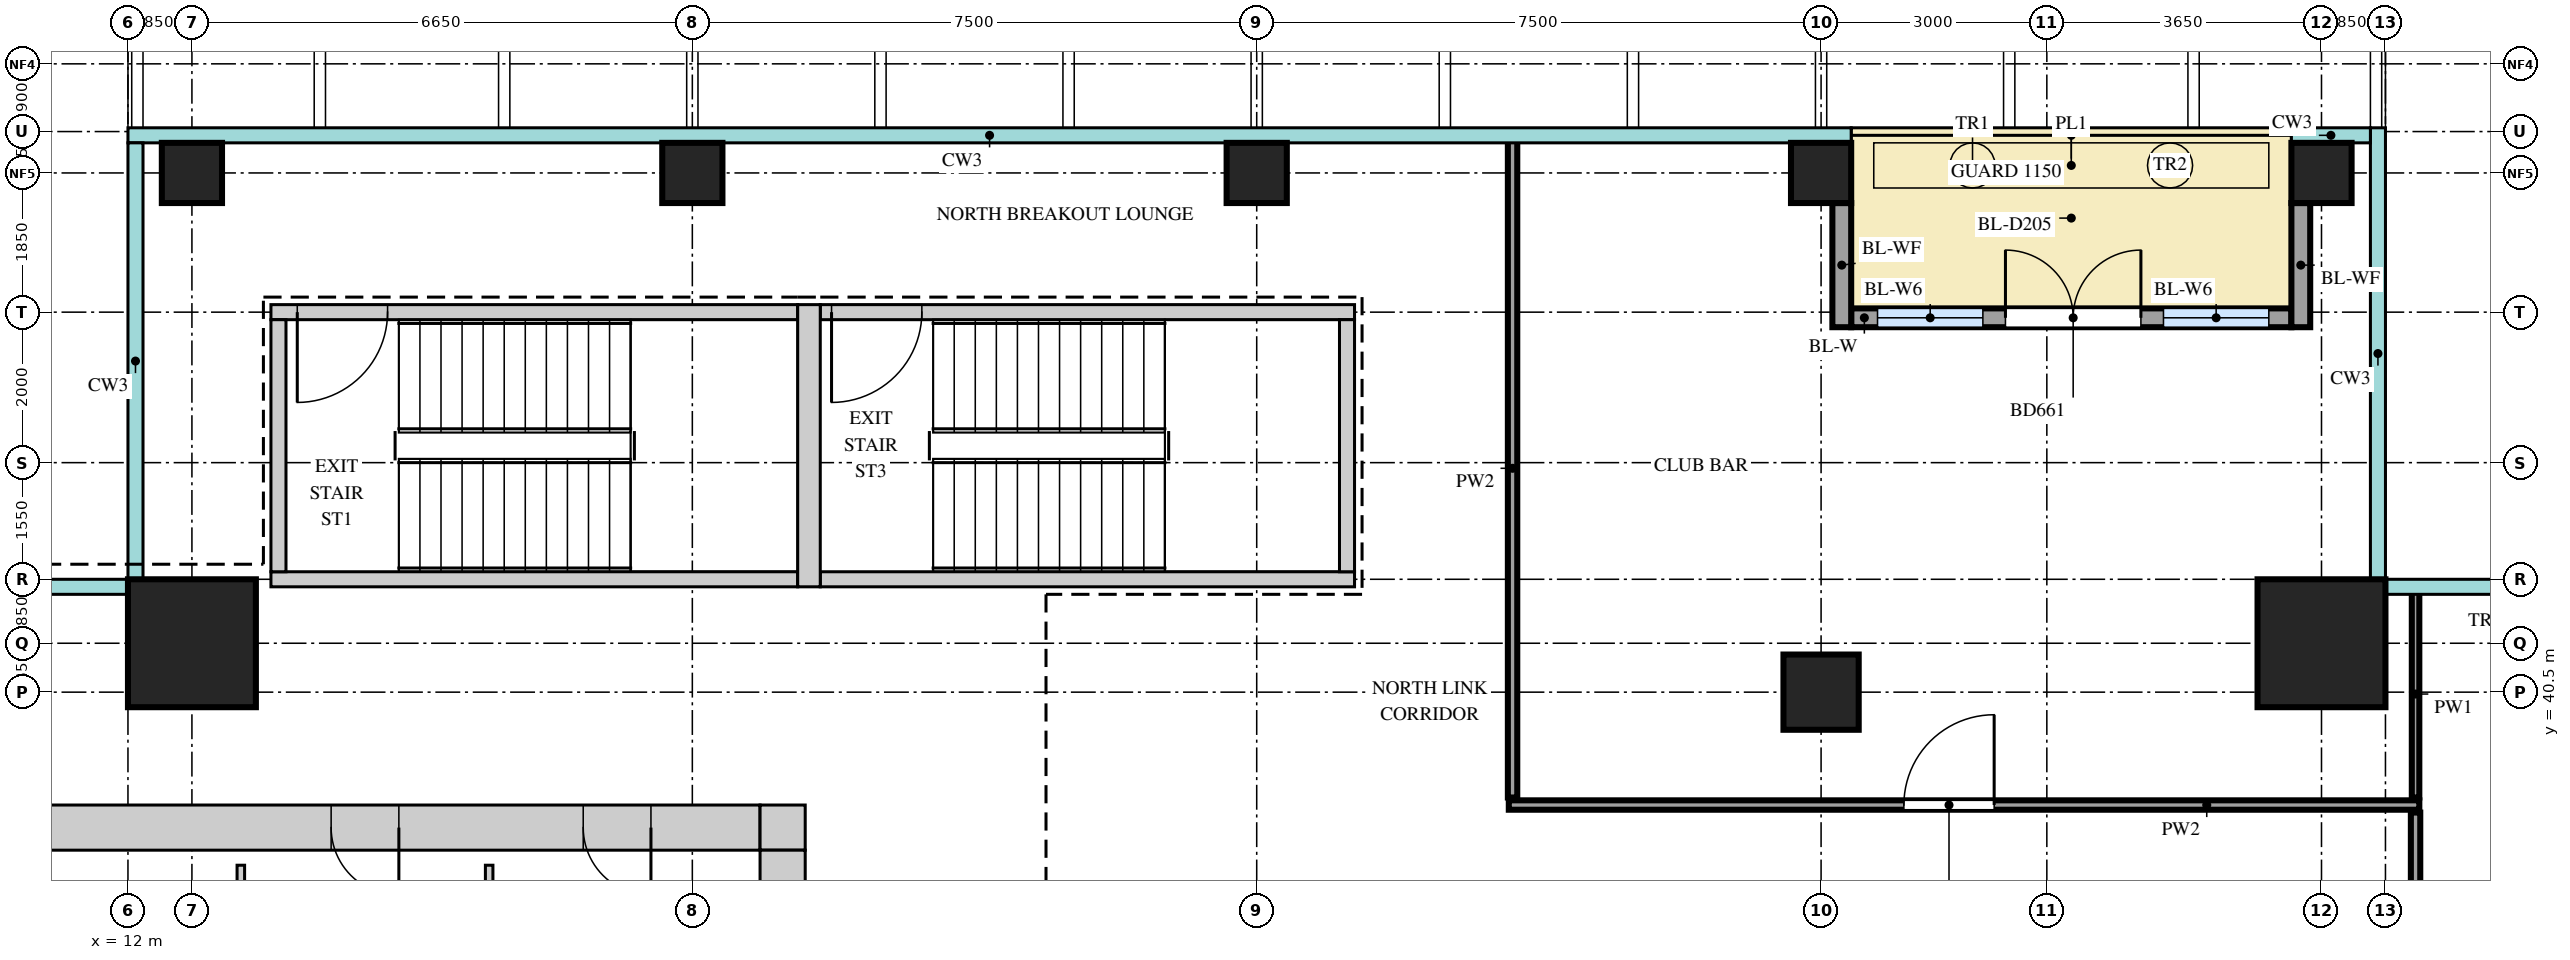
"""IFC4 building model, lengths in metres.
Left out: names, types, materials, properties, quantities, classifications, styles, units other than length and angle.
Written with IfcOpenShell. Run it as: python <this file> out.ifc"""

import sys

from ifc_helpers import new_model, si_unit, direction, frame, frame_2d, origin, origin_2d, place, context, subcontext, project, spatial, rectangle, extrude, source, transform, mapped, element, fill, save


model = new_model("IFC4")
c1 = context("Model", 3, precision=1e-05, world=origin(), true_north=direction((0.0, 1.0)))
c2 = subcontext(c1, "Body", "Model", "MODEL_VIEW")
j1 = project(units=[si_unit("LENGTHUNIT", "METRE"), si_unit("PLANEANGLEUNIT", "RADIAN")], contexts=[c1])
p1 = place(None, origin())
s1 = spatial("IfcSite", under=j1, at=p1, CompositionType="ELEMENT")
p2 = place(p1, origin())
s2 = spatial("IfcBuilding", under=s1, at=p2, CompositionType="ELEMENT")
p3 = place(p2, frame((0.0, 0.0, 294.2)))
s3 = spatial("IfcBuildingStorey", under=s2, at=p3, CompositionType="ELEMENT", Elevation=294.2)
m1 = source(origin(), c2, "Body", "SweptSolid", [
    extrude(rectangle(XDim=14.4, YDim=0.6, at=frame_2d((7.2, 0.0))), origin(), (0.0, 0.0, 1.0), 3.75),
])
p4 = place(p3, frame((6.0, 38.7, 0.0), z_axis=(0.0, 0.0, 1.0), x_axis=(1.0, 0.0, 0.0)))
e1 = element("IfcWall", 1, at=p4, inside=s3, PredefinedType="SHEAR", context=c2, shape_type="MappedRepresentation", body=[
    mapped(m1, transform((0.0, 0.0, 0.0))),
])
m2 = source(origin(), c2, "Body", "SweptSolid", [
    extrude(rectangle(XDim=0.9, YDim=2.1, at=frame_2d((0.45, 1.05))), frame((0.0, 0.31, 0.0), z_axis=(0.0, -1.0, 0.0), x_axis=(1.0, 0.0, 0.0)), (0.0, 0.0, 1.0), 0.62),
])
p5 = place(p4, frame((3.7, 0.0, 0.0)))
e2 = element("IfcOpeningElement", 2, at=p5, cuts=e1, PredefinedType="OPENING", context=c2, shape_type="MappedRepresentation", body=[
    mapped(m2, transform((0.0, 0.0, 0.0))),
])
p6 = place(p4, frame((8.7, 0.0, 0.0)))
e3 = element("IfcOpeningElement", 3, at=p6, cuts=e1, PredefinedType="OPENING", context=c2, shape_type="MappedRepresentation", body=[
    mapped(m2, transform((0.0, 0.0, 0.0))),
])
p7 = place(p4, frame((12.05, 0.0, 0.0)))
e4 = element("IfcOpeningElement", 4, at=p7, cuts=e1, PredefinedType="OPENING", context=c2, shape_type="MappedRepresentation", body=[
    mapped(m2, transform((0.0, 0.0, 0.0))),
])
m3 = source(origin(), c2, "Body", "SweptSolid", [
    extrude(rectangle(XDim=0.6, YDim=0.6, at=frame_2d((0.3, 0.0))), origin(), (0.0, 0.0, 1.0), 3.75),
])
p8 = place(p3, frame((20.4, 38.7, 0.0), z_axis=(0.0, 0.0, 1.0), x_axis=(1.0, 0.0, 0.0)))
e5 = element("IfcWall", 5, at=p8, inside=s3, PredefinedType="SHEAR", context=c2, shape_type="MappedRepresentation", body=[
    mapped(m3, transform((0.0, 0.0, 0.0))),
])
m4 = source(origin(), c2, "Body", "SweptSolid", [
    extrude(rectangle(XDim=22.8, YDim=0.6, at=frame_2d((11.4, 0.0))), origin(), (0.0, 0.0, 1.0), 3.75),
])
p9 = place(p3, frame((20.7, 15.6, 0.0), z_axis=(0.0, 0.0, 1.0), x_axis=(0.0, 1.0, 0.0)))
e6 = element("IfcWall", 6, at=p9, inside=s3, PredefinedType="SHEAR", context=c2, shape_type="MappedRepresentation", body=[
    mapped(m4, transform((0.0, 0.0, 0.0))),
])
m5 = source(origin(), c2, "Body", "SweptSolid", [
    extrude(rectangle(XDim=1.8, YDim=2.1, at=frame_2d((0.9, 1.05))), frame((0.0, 0.31, 0.0), z_axis=(0.0, -1.0, 0.0), x_axis=(1.0, 0.0, 0.0)), (0.0, 0.0, 1.0), 0.62),
])
p10 = place(p9, frame((10.9, 0.0, 0.0)))
e7 = element("IfcOpeningElement", 7, at=p10, cuts=e6, PredefinedType="OPENING", context=c2, shape_type="MappedRepresentation", body=[
    mapped(m5, transform((0.0, 0.0, 0.0))),
])
p11 = place(p9, frame((0.55, 0.0, 0.0)))
e8 = element("IfcOpeningElement", 8, at=p11, cuts=e6, PredefinedType="OPENING", context=c2, shape_type="MappedRepresentation", body=[
    mapped(m2, transform((0.0, 0.0, 0.0))),
])
p12 = place(p9, frame((4.1, 0.0, 0.0)))
e9 = element("IfcOpeningElement", 9, at=p12, cuts=e6, PredefinedType="OPENING", context=c2, shape_type="MappedRepresentation", body=[
    mapped(m2, transform((0.0, 0.0, 0.0))),
])
m6 = source(origin(), c2, "Body", "SweptSolid", [
    extrude(rectangle(XDim=7.0, YDim=0.2, at=frame_2d((3.5, 0.0))), origin(), (0.0, 0.0, 1.0), 3.75),
])
p13 = place(p3, frame((13.9, 45.55, 0.0), z_axis=(0.0, 0.0, 1.0), x_axis=(1.0, 0.0, 0.0)))
e10 = element("IfcWall", 10, at=p13, inside=s3, PredefinedType="SHEAR", context=c2, shape_type="MappedRepresentation", body=[
    mapped(m6, transform((0.0, 0.0, 0.0))),
])
m7 = source(origin(), c2, "Body", "SweptSolid", [
    extrude(rectangle(XDim=1.2, YDim=2.1, at=frame_2d((0.6, 1.05))), frame((0.0, 0.11, 0.0), z_axis=(0.0, -1.0, 0.0), x_axis=(1.0, 0.0, 0.0)), (0.0, 0.0, 1.0), 0.22),
])
p14 = place(p13, frame((0.35, 0.0, 0.0)))
e11 = element("IfcOpeningElement", 11, at=p14, cuts=e10, PredefinedType="OPENING", context=c2, shape_type="MappedRepresentation", body=[
    mapped(m7, transform((0.0, 0.0, 0.0))),
])
p15 = place(p3, frame((13.9, 42.0, 0.0), z_axis=(0.0, 0.0, 1.0), x_axis=(1.0, 0.0, 0.0)))
e12 = element("IfcWall", 12, at=p15, inside=s3, PredefinedType="SHEAR", context=c2, shape_type="MappedRepresentation", body=[
    mapped(m6, transform((0.0, 0.0, 0.0))),
])
m8 = source(origin(), c2, "Body", "SweptSolid", [
    extrude(rectangle(XDim=7.1, YDim=0.2, at=frame_2d((3.55, 0.0))), origin(), (0.0, 0.0, 1.0), 3.75),
])
p16 = place(p3, frame((21.2, 45.55, 0.0), z_axis=(0.0, 0.0, 1.0), x_axis=(1.0, 0.0, 0.0)))
e13 = element("IfcWall", 13, at=p16, inside=s3, PredefinedType="SHEAR", context=c2, shape_type="MappedRepresentation", body=[
    mapped(m8, transform((0.0, 0.0, 0.0))),
])
p17 = place(p16, frame((0.15, 0.0, 0.0)))
e14 = element("IfcOpeningElement", 14, at=p17, cuts=e13, PredefinedType="OPENING", context=c2, shape_type="MappedRepresentation", body=[
    mapped(m7, transform((0.0, 0.0, 0.0))),
])
p18 = place(p3, frame((21.2, 42.0, 0.0), z_axis=(0.0, 0.0, 1.0), x_axis=(1.0, 0.0, 0.0)))
e15 = element("IfcWall", 15, at=p18, inside=s3, PredefinedType="SHEAR", context=c2, shape_type="MappedRepresentation", body=[
    mapped(m8, transform((0.0, 0.0, 0.0))),
])
m9 = source(origin(), c2, "Body", "SweptSolid", [
    extrude(rectangle(XDim=3.75, YDim=0.3, at=frame_2d((1.875, 0.0))), origin(), (0.0, 0.0, 1.0), 3.75),
])
p19 = place(p3, frame((21.05, 41.9, 0.0), z_axis=(0.0, 0.0, 1.0), x_axis=(0.0, 1.0, 0.0)))
e16 = element("IfcWall", 16, at=p19, inside=s3, PredefinedType="SHEAR", context=c2, shape_type="MappedRepresentation", body=[
    mapped(m9, transform((0.0, 0.0, 0.0))),
])
m10 = source(origin(), c2, "Body", "SweptSolid", [
    extrude(rectangle(XDim=3.35, YDim=0.2, at=frame_2d((1.675, 0.0))), origin(), (0.0, 0.0, 1.0), 3.75),
])
for number, where, z_axis, x_axis in (
    (17, (14.0, 42.1, 0.0), (0.0, 0.0, 1.0), (0.0, 1.0, 0.0)),
    (18, (28.2, 42.1, 0.0), (0.0, 0.0, 1.0), (0.0, 1.0, 0.0)),
):
    element("IfcWall", number, at=place(p3, frame(where, z_axis=z_axis, x_axis=x_axis)), inside=s3, PredefinedType="SHEAR", context=c2, shape_type="MappedRepresentation", body=[
        mapped(m10, transform((0.0, 0.0, 0.0))),
    ])
m11 = source(origin(), c2, "Body", "SweptSolid", [
    extrude(rectangle(XDim=1.7, YDim=1.7, at=origin_2d()), origin(), (0.0, 0.0, 1.0), 3.75),
])
for number, where, z_axis, x_axis in (
    (19, (41.15, 41.15, 0.0), (0.0, 0.0, 1.0), (1.0, 0.0, 0.0)),
    (20, (12.85, 41.15, 0.0), (0.0, 0.0, 1.0), (1.0, 0.0, 0.0)),
):
    element("IfcColumn", number, at=place(p3, frame(where, z_axis=z_axis, x_axis=x_axis)), inside=s3, PredefinedType="COLUMN", context=c2, shape_type="MappedRepresentation", body=[
        mapped(m11, transform((0.0, 0.0, 0.0))),
    ])
m12 = source(origin(), c2, "Body", "SweptSolid", [
    extrude(rectangle(XDim=0.8, YDim=0.8, at=origin_2d()), origin(), (0.0, 0.0, 1.0), 3.75),
])
for number, where, z_axis, x_axis in (
    (21, (12.85, 47.4, 0.0), (0.0, 0.0, 1.0), (1.0, 0.0, 0.0)),
    (22, (19.5, 47.4, 0.0), (0.0, 0.0, 1.0), (1.0, 0.0, 0.0)),
    (23, (27.0, 47.4, 0.0), (0.0, 0.0, 1.0), (1.0, 0.0, 0.0)),
    (24, (34.5, 47.4, 0.0), (0.0, 0.0, 1.0), (1.0, 0.0, 0.0)),
    (25, (41.15, 47.4, 0.0), (0.0, 0.0, 1.0), (1.0, 0.0, 0.0)),
):
    element("IfcColumn", number, at=place(p3, frame(where, z_axis=z_axis, x_axis=x_axis)), inside=s3, PredefinedType="COLUMN", context=c2, shape_type="MappedRepresentation", body=[
        mapped(m12, transform((0.0, 0.0, 0.0))),
    ])
m13 = source(origin(), c2, "Body", "SweptSolid", [
    extrude(rectangle(XDim=1.0, YDim=1.0, at=origin_2d()), origin(), (0.0, 0.0, 1.0), 3.75),
])
p20 = place(p3, frame((34.5, 40.5, 0.0), z_axis=(0.0, 0.0, 1.0), x_axis=(1.0, 0.0, 0.0)))
e26 = element("IfcColumn", 26, at=p20, inside=s3, PredefinedType="COLUMN", context=c2, shape_type="MappedRepresentation", body=[
    mapped(m13, transform((0.0, 0.0, 0.0))),
])
m14 = source(origin(), c2, "Body", "SweptSolid", [
    extrude(rectangle(XDim=5.85, YDim=0.25, at=frame_2d((2.925, 0.0))), origin(), (0.0, 0.0, 1.0), 3.75),
])
p21 = place(p3, frame((34.9, 45.475, 0.0), z_axis=(0.0, 0.0, 1.0), x_axis=(1.0, 0.0, 0.0)))
e27 = element("IfcWall", 27, at=p21, inside=s3, PredefinedType="SOLIDWALL", context=c2, shape_type="MappedRepresentation", body=[
    mapped(m14, transform((0.0, 0.0, 0.0))),
])
m15 = source(origin(), c2, "Body", "SweptSolid", [
    extrude(rectangle(XDim=1.4, YDim=2.4, at=frame_2d((0.7, 1.2))), frame((0.0, 0.135, 0.0), z_axis=(0.0, -1.0, 0.0), x_axis=(1.0, 0.0, 0.0)), (0.0, 0.0, 1.0), 0.27),
])
p22 = place(p21, frame((0.35, 0.0, 0.0)))
e28 = element("IfcOpeningElement", 28, at=p22, cuts=e27, PredefinedType="OPENING", context=c2, shape_type="MappedRepresentation", body=[
    mapped(m15, transform((0.0, 0.0, 0.0))),
])
p23 = place(p21, frame((4.15, 0.0, 0.0)))
e29 = element("IfcOpeningElement", 29, at=p23, cuts=e27, PredefinedType="OPENING", context=c2, shape_type="MappedRepresentation", body=[
    mapped(m15, transform((0.0, 0.0, 0.0))),
])
m16 = source(origin(), c2, "Body", "SweptSolid", [
    extrude(rectangle(XDim=1.8, YDim=2.4, at=frame_2d((0.9, 1.2))), frame((0.0, 0.135, 0.0), z_axis=(0.0, -1.0, 0.0), x_axis=(1.0, 0.0, 0.0)), (0.0, 0.0, 1.0), 0.27),
])
p24 = place(p21, frame((2.05, 0.0, 0.0)))
e30 = element("IfcOpeningElement", 30, at=p24, cuts=e27, PredefinedType="OPENING", context=c2, shape_type="MappedRepresentation", body=[
    mapped(m16, transform((0.0, 0.0, 0.0))),
])
m17 = source(origin(), c2, "Body", "SweptSolid", [
    extrude(rectangle(XDim=1.65, YDim=0.25, at=frame_2d((0.825, 0.0))), origin(), (0.0, 0.0, 1.0), 3.45),
])
for number, where, z_axis, x_axis in (
    (31, (34.775, 47.0, 0.0), (0.0, 0.0, 1.0), (0.0, -1.0, 0.0)),
    (32, (40.875, 47.0, 0.0), (0.0, 0.0, 1.0), (0.0, -1.0, 0.0)),
):
    element("IfcWall", number, at=place(p3, frame(where, z_axis=z_axis, x_axis=x_axis)), inside=s3, PredefinedType="SOLIDWALL", context=c2, shape_type="MappedRepresentation", body=[
        mapped(m17, transform((0.0, 0.0, 0.0))),
    ])
m18 = source(origin(), c2, "Body", "SweptSolid", [
    extrude(rectangle(XDim=23.8, YDim=0.125, at=frame_2d((11.9, 0.0))), origin(), (0.0, 0.0, 1.0), 3.8),
])
p25 = place(p3, frame((42.4, 15.1, 0.0), z_axis=(0.0, 0.0, 1.0), x_axis=(0.0, 1.0, 0.0)))
e33 = element("IfcWall", 33, at=p25, inside=s3, PredefinedType="PARTITIONING", context=c2, shape_type="MappedRepresentation", body=[
    mapped(m18, transform((0.0, 0.0, 0.0))),
])
m19 = source(origin(), c2, "Body", "SweptSolid", [
    extrude(rectangle(XDim=0.9, YDim=2.1, at=frame_2d((0.45, 1.05))), frame((0.0, 0.073, 0.0), z_axis=(0.0, -1.0, 0.0), x_axis=(1.0, 0.0, 0.0)), (0.0, 0.0, 1.0), 0.145),
])
p26 = place(p25, frame((1.55, 0.0, 0.0)))
e34 = element("IfcOpeningElement", 34, at=p26, cuts=e33, PredefinedType="OPENING", context=c2, shape_type="MappedRepresentation", body=[
    mapped(m19, transform((0.0, 0.0, 0.0))),
])
p27 = place(p25, frame((5.55, 0.0, 0.0)))
e35 = element("IfcOpeningElement", 35, at=p27, cuts=e33, PredefinedType="OPENING", context=c2, shape_type="MappedRepresentation", body=[
    mapped(m19, transform((0.0, 0.0, 0.0))),
])
p28 = place(p25, frame((9.05, 0.0, 0.0)))
e36 = element("IfcOpeningElement", 36, at=p28, cuts=e33, PredefinedType="OPENING", context=c2, shape_type="MappedRepresentation", body=[
    mapped(m19, transform((0.0, 0.0, 0.0))),
])
m20 = source(origin(), c2, "Body", "SweptSolid", [
    extrude(rectangle(XDim=1.0, YDim=2.1, at=frame_2d((0.5, 1.05))), frame((0.0, 0.073, 0.0), z_axis=(0.0, -1.0, 0.0), x_axis=(1.0, 0.0, 0.0)), (0.0, 0.0, 1.0), 0.145),
])
p29 = place(p25, frame((12.4, 0.0, 0.0)))
e37 = element("IfcOpeningElement", 37, at=p29, cuts=e33, PredefinedType="OPENING", context=c2, shape_type="MappedRepresentation", body=[
    mapped(m20, transform((0.0, 0.0, 0.0))),
])
p30 = place(p25, frame((16.6, 0.0, 0.0)))
e38 = element("IfcOpeningElement", 38, at=p30, cuts=e33, PredefinedType="OPENING", context=c2, shape_type="MappedRepresentation", body=[
    mapped(m19, transform((0.0, 0.0, 0.0))),
])
p31 = place(p25, frame((21.05, 0.0, 0.0)))
e39 = element("IfcOpeningElement", 39, at=p31, cuts=e33, PredefinedType="OPENING", context=c2, shape_type="MappedRepresentation", body=[
    mapped(m19, transform((0.0, 0.0, 0.0))),
])
m21 = source(origin(), c2, "Body", "SweptSolid", [
    extrude(rectangle(XDim=6.0, YDim=0.1, at=frame_2d((3.0, 0.0))), origin(), (0.0, 0.0, 1.0), 3.8),
])
p32 = place(p3, frame((13.5, 32.2, 0.0), z_axis=(0.0, 0.0, 1.0), x_axis=(0.0, 1.0, 0.0)))
e40 = element("IfcWall", 40, at=p32, inside=s3, PredefinedType="PARTITIONING", context=c2, shape_type="MappedRepresentation", body=[
    mapped(m21, transform((0.0, 0.0, 0.0))),
])
m22 = source(origin(), c2, "Body", "SweptSolid", [
    extrude(rectangle(XDim=5.9, YDim=0.1, at=frame_2d((2.95, 0.0))), origin(), (0.0, 0.0, 1.0), 3.8),
])
p33 = place(p3, frame((16.8, 32.3, 0.0), z_axis=(0.0, 0.0, 1.0), x_axis=(0.0, 1.0, 0.0)))
e41 = element("IfcWall", 41, at=p33, inside=s3, PredefinedType="PARTITIONING", context=c2, shape_type="MappedRepresentation", body=[
    mapped(m22, transform((0.0, 0.0, 0.0))),
])
m23 = source(origin(), c2, "Body", "SweptSolid", [
    extrude(rectangle(XDim=12.1, YDim=0.125, at=frame_2d((6.05, 0.0))), origin(), (0.0, 0.0, 1.0), 3.8),
])
p34 = place(p3, frame((30.35, 39.0, 0.0), z_axis=(0.0, 0.0, 1.0), x_axis=(1.0, 0.0, 0.0)))
e42 = element("IfcWall", 42, at=p34, inside=s3, PredefinedType="PARTITIONING", context=c2, shape_type="MappedRepresentation", body=[
    mapped(m23, transform((0.0, 0.0, 0.0))),
])
m24 = source(origin(), c2, "Body", "SweptSolid", [
    extrude(rectangle(XDim=1.2, YDim=2.1, at=frame_2d((0.6, 1.05))), frame((0.0, 0.073, 0.0), z_axis=(0.0, -1.0, 0.0), x_axis=(1.0, 0.0, 0.0)), (0.0, 0.0, 1.0), 0.145),
])
p35 = place(p34, frame((5.25, 0.0, 0.0)))
e43 = element("IfcOpeningElement", 43, at=p35, cuts=e42, PredefinedType="OPENING", context=c2, shape_type="MappedRepresentation", body=[
    mapped(m24, transform((0.0, 0.0, 0.0))),
])
m25 = source(origin(), c2, "Body", "SweptSolid", [
    extrude(rectangle(XDim=8.75, YDim=0.125, at=frame_2d((4.375, 0.0))), origin(), (0.0, 0.0, 1.0), 3.8),
])
p36 = place(p3, frame((30.4, 39.1, 0.0), z_axis=(0.0, 0.0, 1.0), x_axis=(0.0, 1.0, 0.0)))
e44 = element("IfcWall", 44, at=p36, inside=s3, PredefinedType="PARTITIONING", context=c2, shape_type="MappedRepresentation", body=[
    mapped(m25, transform((0.0, 0.0, 0.0))),
])
m26 = source(origin(), c2, "Body", "SweptSolid", [
    extrude(rectangle(XDim=2.75, YDim=0.1, at=frame_2d((1.375, 0.0))), origin(), (0.0, 0.0, 1.0), 3.8),
])
p37 = place(p3, frame((42.4, 39.1, 0.0), z_axis=(0.0, 0.0, 1.0), x_axis=(0.0, 1.0, 0.0)))
e45 = element("IfcWall", 45, at=p37, inside=s3, PredefinedType="PARTITIONING", context=c2, shape_type="MappedRepresentation", body=[
    mapped(m26, transform((0.0, 0.0, 0.0))),
])
m27 = source(origin(), c2, "Body", "SweptSolid", [
    extrude(rectangle(XDim=1.4, YDim=2.4, at=frame_2d((0.7, 1.2))), frame((0.0, 0.03, 0.0), z_axis=(0.0, -1.0, 0.0), x_axis=(1.0, 0.0, 0.0)), (0.0, 0.0, 1.0), 0.06),
])
p38 = place(p22, origin())
e46 = element("IfcWindow", 46, at=p38, inside=s3, PartitioningType="SINGLE_PANEL", PredefinedType="WINDOW", context=c2, shape_type="MappedRepresentation", body=[
    mapped(m27, transform((0.0, 0.0, 0.0))),
])
fill(e28, e46)
p39 = place(p23, origin())
e47 = element("IfcWindow", 47, at=p39, inside=s3, PartitioningType="SINGLE_PANEL", PredefinedType="WINDOW", context=c2, shape_type="MappedRepresentation", body=[
    mapped(m27, transform((0.0, 0.0, 0.0))),
])
fill(e29, e47)
m28 = source(origin(), c2, "Body", "SweptSolid", [
    extrude(rectangle(XDim=1.8, YDim=2.4, at=frame_2d((0.9, 1.2))), frame((0.0, 0.025, 0.0), z_axis=(0.0, -1.0, 0.0), x_axis=(1.0, 0.0, 0.0)), (0.0, 0.0, 1.0), 0.05),
])
p40 = place(p24, origin())
e48 = element("IfcDoor", 48, at=p40, inside=s3, OperationType="DOUBLE_DOOR_DOUBLE_SWING", PredefinedType="DOOR", context=c2, shape_type="MappedRepresentation", body=[
    mapped(m28, transform((0.0, 0.0, 0.0))),
])
fill(e30, e48)
m29 = source(origin(), c2, "Body", "SweptSolid", [
    extrude(rectangle(XDim=0.9, YDim=2.1, at=frame_2d((0.45, 1.05))), frame((0.0, 0.25, 0.0), z_axis=(0.0, -1.0, 0.0), x_axis=(1.0, 0.0, 0.0)), (0.0, 0.0, 1.0), 0.5),
])
p41 = place(p6, origin())
e49 = element("IfcDoor", 49, at=p41, inside=s3, OperationType="SINGLE_SWING_RIGHT", PredefinedType="DOOR", context=c2, shape_type="MappedRepresentation", body=[
    mapped(m29, transform((0.0, 0.0, 0.0))),
])
fill(e3, e49)
p42 = place(p7, origin())
e50 = element("IfcDoor", 50, at=p42, inside=s3, OperationType="SINGLE_SWING_RIGHT", PredefinedType="DOOR", context=c2, shape_type="MappedRepresentation", body=[
    mapped(m29, transform((0.0, 0.0, 0.0))),
])
fill(e4, e50)
m30 = source(origin(), c2, "Body", "SweptSolid", [
    extrude(rectangle(XDim=1.2, YDim=2.1, at=frame_2d((0.6, 1.05))), frame((0.0, 0.025, 0.0), z_axis=(0.0, -1.0, 0.0), x_axis=(1.0, 0.0, 0.0)), (0.0, 0.0, 1.0), 0.05),
])
p43 = place(p35, origin())
e51 = element("IfcDoor", 51, at=p43, inside=s3, OperationType="SINGLE_SWING_LEFT", PredefinedType="DOOR", context=c2, shape_type="MappedRepresentation", body=[
    mapped(m30, transform((0.0, 0.0, 0.0))),
])
fill(e43, e51)
p44 = place(p14, origin())
e52 = element("IfcDoor", 52, at=p44, inside=s3, OperationType="SINGLE_SWING_LEFT", PredefinedType="DOOR", context=c2, shape_type="MappedRepresentation", body=[
    mapped(m30, transform((0.0, 0.0, 0.0))),
])
fill(e11, e52)
p45 = place(p17, origin())
e53 = element("IfcDoor", 53, at=p45, inside=s3, OperationType="SINGLE_SWING_LEFT", PredefinedType="DOOR", context=c2, shape_type="MappedRepresentation", body=[
    mapped(m30, transform((0.0, 0.0, 0.0))),
])
fill(e14, e53)
save(model, sys.argv[1])
